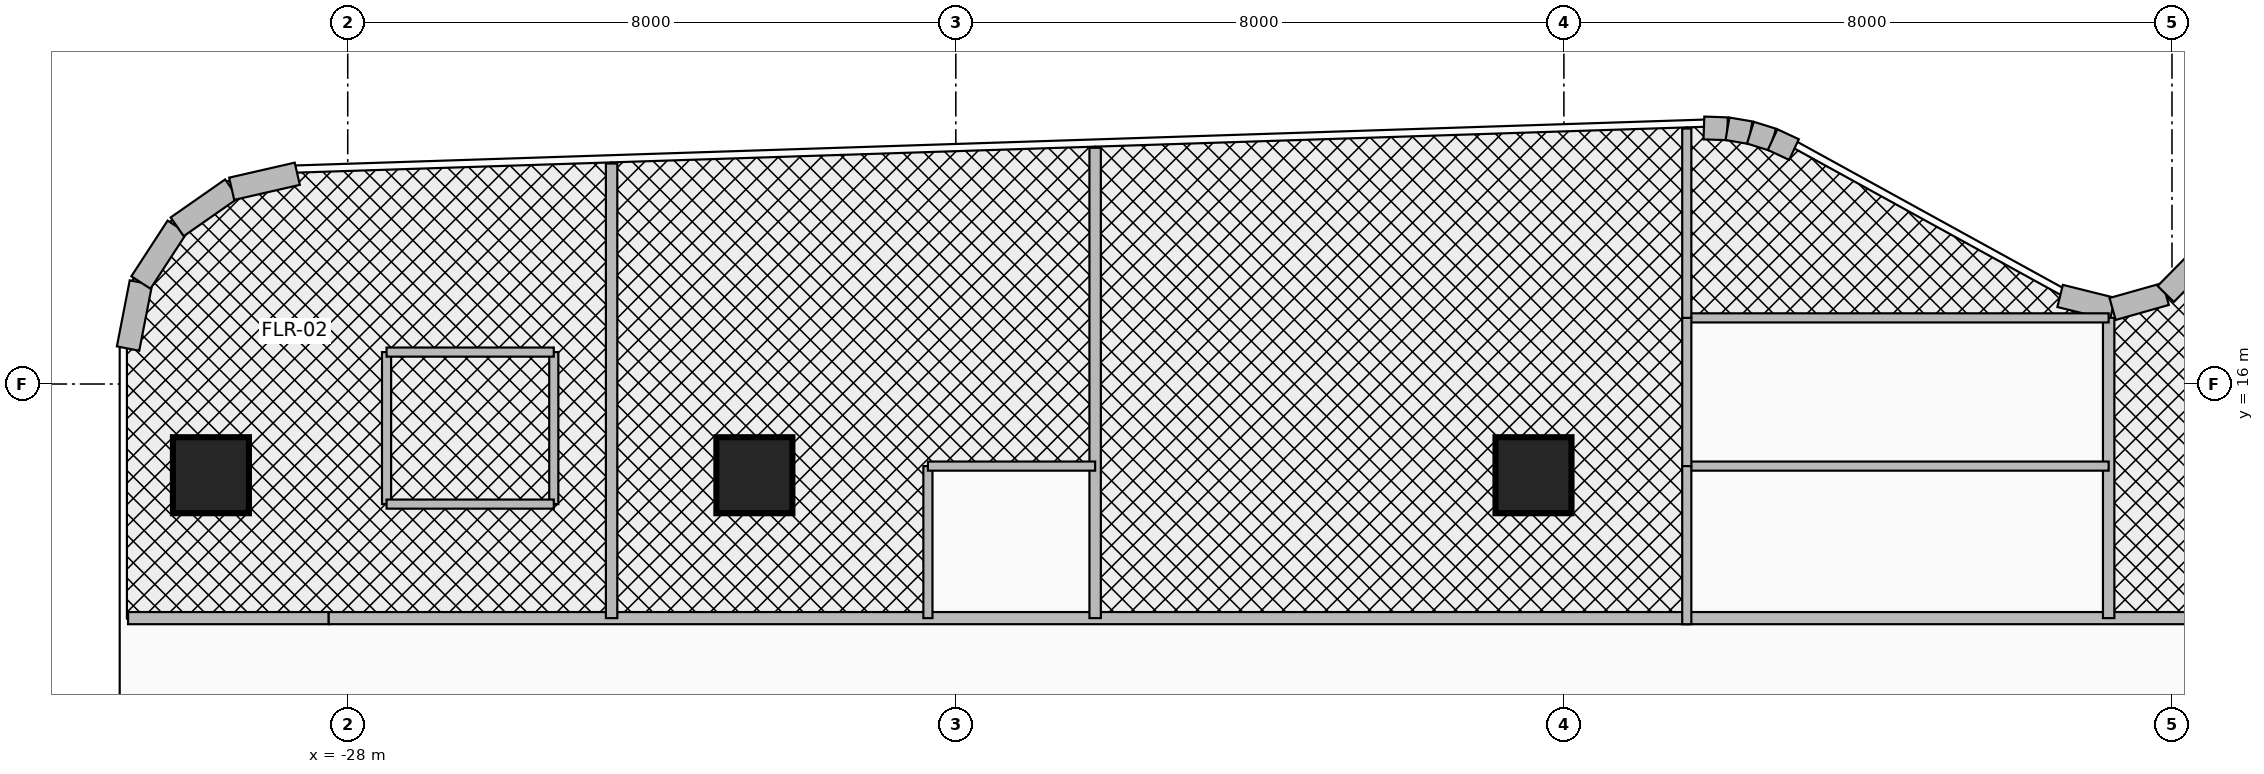
"""IFC4 building model, lengths in metres.
Left out: names, types, materials, properties, quantities, classifications, styles, units other than length and angle.
Written with IfcOpenShell. Run it as: python <this file> out.ifc"""

import sys

from ifc_helpers import new_model, si_unit, direction, frame, frame_2d, origin, origin_2d, place, context, subcontext, project, spatial, rectangle, extrude, source, transform, mapped, element, fill, save


model = new_model("IFC4")
c1 = context("Model", 3, precision=1e-05, world=origin(), true_north=direction((0.0, 1.0)))
c2 = subcontext(c1, "Body", "Model", "MODEL_VIEW")
j1 = project(units=[si_unit("LENGTHUNIT", "METRE"), si_unit("PLANEANGLEUNIT", "RADIAN")], contexts=[c1])
p1 = place(None, origin())
s1 = spatial("IfcSite", under=j1, at=p1, CompositionType="ELEMENT")
p2 = place(p1, origin())
s2 = spatial("IfcBuilding", under=s1, at=p2, CompositionType="ELEMENT")
p3 = place(p2, frame((0.0, 0.0, 180.5)))
s3 = spatial("IfcBuildingStorey", under=s2, at=p3, CompositionType="ELEMENT", Elevation=180.5)
m1 = source(origin(), c2, "Body", "SweptSolid", [
    extrude(rectangle(XDim=1.0, YDim=1.0, at=origin_2d()), origin(), (0.0, 0.0, 1.0), 3.95),
])
for number, where, z_axis, x_axis in (
    (1, (-29.8, 14.8, 0.0), (0.0, 0.0, 1.0), (1.0, 0.0, 0.0)),
    (2, (-22.65, 14.8, 0.0), (0.0, 0.0, 1.0), (1.0, 0.0, 0.0)),
    (3, (-12.4, 14.8, 0.0), (0.0, 0.0, 1.0), (1.0, 0.0, 0.0)),
):
    element("IfcColumn", number, at=place(p3, frame(where, z_axis=z_axis, x_axis=x_axis)), inside=s3, PredefinedType="COLUMN", context=c2, shape_type="MappedRepresentation", body=[
        mapped(m1, transform((0.0, 0.0, 0.0), x_axis=(1.0, 0.0, 0.0), y_axis=(0.0, 1.0, 0.0), z_axis=(0.0, 0.0, 1.0), scale=1.0)),
    ])
p4 = place(p3, frame((-30.89, 16.466, 0.0), z_axis=(0.0, 0.0, 1.0), x_axis=(0.191128020887, 0.981565117367, 0.0)))
e4 = element("IfcWall", 4, at=p4, inside=s3, PredefinedType="SOLIDWALL", context=c2, shape_type="SweptSolid", body=[
    extrude(rectangle(XDim=0.885, YDim=0.3, at=frame_2d((0.443, 0.0))), origin(), (0.0, 0.0, 1.0), 3.63),
])
p5 = place(p3, frame((-30.721, 17.335, 0.0), z_axis=(0.0, 0.0, 1.0), x_axis=(0.545322000684, 0.838226649284, 0.0)))
e5 = element("IfcWall", 5, at=p5, inside=s3, PredefinedType="SOLIDWALL", context=c2, shape_type="SweptSolid", body=[
    extrude(rectangle(XDim=0.874, YDim=0.3, at=frame_2d((0.437, 0.0))), origin(), (0.0, 0.0, 1.0), 3.63),
])
p6 = place(p3, frame((-30.244, 18.068, 0.0), z_axis=(0.0, 0.0, 1.0), x_axis=(0.820005059444, 0.572356272339, 0.0)))
e6 = element("IfcWall", 6, at=p6, inside=s3, PredefinedType="SOLIDWALL", context=c2, shape_type="SweptSolid", body=[
    extrude(rectangle(XDim=0.875, YDim=0.3, at=frame_2d((0.437, 0.0))), origin(), (0.0, 0.0, 1.0), 3.63),
])
p7 = place(p3, frame((-29.527, 18.569, 0.0), z_axis=(0.0, 0.0, 1.0), x_axis=(0.974798570829, 0.223086858218, 0.0)))
e7 = element("IfcWall", 7, at=p7, inside=s3, PredefinedType="SOLIDWALL", context=c2, shape_type="SweptSolid", body=[
    extrude(rectangle(XDim=0.885, YDim=0.3, at=frame_2d((0.443, 0.0))), origin(), (0.0, 0.0, 1.0), 3.63),
])
p8 = place(p3, frame((-10.158, 19.368, 0.0), z_axis=(0.0, 0.0, 1.0), x_axis=(0.999425494718, -0.03389218949, 0.0)))
e8 = element("IfcWall", 8, at=p8, inside=s3, PredefinedType="SOLIDWALL", context=c2, shape_type="SweptSolid", body=[
    extrude(rectangle(XDim=0.31, YDim=0.3, at=frame_2d((0.155, 0.0))), origin(), (0.0, 0.0, 1.0), 3.63),
])
for number, where, z_axis, x_axis in (
    (9, (-9.848, 19.358, 0.0), (0.0, 0.0, 1.0), (0.986, -0.167, 0.0)),
    (10, (-9.546, 19.307, 0.0), (0.0, 0.0, 1.0), (0.955, -0.297, 0.0)),
):
    element("IfcWall", number, at=place(p3, frame(where, z_axis=z_axis, x_axis=x_axis)), inside=s3, PredefinedType="SOLIDWALL", context=c2, shape_type="SweptSolid", body=[
        extrude(rectangle(XDim=0.306, YDim=0.3, at=frame_2d((0.153, 0.0))), origin(), (0.0, 0.0, 1.0), 3.63),
    ])
p9 = place(p3, frame((-9.254, 19.216, 0.0), z_axis=(0.0, 0.0, 1.0), x_axis=(0.906524902388, -0.42215234377, 0.0)))
e11 = element("IfcWall", 11, at=p9, inside=s3, PredefinedType="SOLIDWALL", context=c2, shape_type="SweptSolid", body=[
    extrude(rectangle(XDim=0.31, YDim=0.3, at=frame_2d((0.155, 0.0))), origin(), (0.0, 0.0, 1.0), 3.63),
])
p10 = place(p3, frame((-5.472, 17.159, 0.0), z_axis=(0.0, 0.0, 1.0), x_axis=(0.970564820059, -0.240840050789, 0.0)))
e12 = element("IfcWall", 12, at=p10, inside=s3, PredefinedType="SOLIDWALL", context=c2, shape_type="SweptSolid", body=[
    extrude(rectangle(XDim=0.712, YDim=0.3, at=frame_2d((0.356, 0.0))), origin(), (0.0, 0.0, 1.0), 3.63),
])
p11 = place(p3, frame((-4.781, 16.987, 0.0), z_axis=(0.0, 0.0, 1.0), x_axis=(0.962494705656, 0.271300463662, 0.0)))
e13 = element("IfcWall", 13, at=p11, inside=s3, PredefinedType="SOLIDWALL", context=c2, shape_type="SweptSolid", body=[
    extrude(rectangle(XDim=0.726, YDim=0.3, at=frame_2d((0.363, 0.0))), origin(), (0.0, 0.0, 1.0), 3.63),
])
p12 = place(p3, frame((-4.082, 17.184, 0.0), z_axis=(0.0, 0.0, 1.0), x_axis=(0.701538604215, 0.712631452293, 0.0)))
e14 = element("IfcWall", 14, at=p12, inside=s3, PredefinedType="SOLIDWALL", context=c2, shape_type="SweptSolid", body=[
    extrude(rectangle(XDim=0.726, YDim=0.3, at=frame_2d((0.363, 0.0))), origin(), (0.0, 0.0, 1.0), 2.615),
])
p13 = place(p3, frame((-30.89, 12.92, 0.0), z_axis=(0.0, 0.0, 1.0), x_axis=(1.0, 0.0, 0.0)))
e15 = element("IfcWall", 15, at=p13, inside=s3, PredefinedType="PARTITIONING", context=c2, shape_type="SweptSolid", body=[
    extrude(rectangle(XDim=2.64, YDim=0.16, at=frame_2d((1.32, 0.0))), origin(), (0.0, 0.0, 1.0), 3.076),
])
p14 = place(p3, frame((-28.25, 12.92, 0.0), z_axis=(0.0, 0.0, 1.0), x_axis=(1.0, 0.0, 0.0)))
e16 = element("IfcWall", 16, at=p14, inside=s3, PredefinedType="PARTITIONING", context=c2, shape_type="SweptSolid", body=[
    extrude(rectangle(XDim=36.75, YDim=0.16, at=frame_2d((18.375, 0.0))), origin(), (0.0, 0.0, 1.0), 2.615),
])
p15 = place(p14, frame((1.386, 0.0, 0.0)))
e17 = element("IfcOpeningElement", 17, at=p15, cuts=e16, PredefinedType="OPENING", context=c2, shape_type="SweptSolid", body=[
    extrude(rectangle(XDim=0.95, YDim=2.15, at=frame_2d((0.475, 1.075))), frame((0.0, 0.095, 0.0), z_axis=(0.0, -1.0, 0.0), x_axis=(1.0, 0.0, 0.0)), (0.0, 0.0, 1.0), 0.19),
])
p16 = place(p14, frame((5.327, 0.0, 0.0)))
e18 = element("IfcOpeningElement", 18, at=p16, cuts=e16, PredefinedType="OPENING", context=c2, shape_type="SweptSolid", body=[
    extrude(rectangle(XDim=0.95, YDim=2.15, at=frame_2d((0.475, 1.075))), frame((0.0, 0.095, 0.0), z_axis=(0.0, -1.0, 0.0), x_axis=(1.0, 0.0, 0.0)), (0.0, 0.0, 1.0), 0.19),
])
p17 = place(p14, frame((13.5, 0.0, 0.0)))
e19 = element("IfcOpeningElement", 19, at=p17, cuts=e16, PredefinedType="OPENING", context=c2, shape_type="SweptSolid", body=[
    extrude(rectangle(XDim=0.95, YDim=2.15, at=frame_2d((0.475, 1.075))), frame((0.0, 0.095, 0.0), z_axis=(0.0, -1.0, 0.0), x_axis=(1.0, 0.0, 0.0)), (0.0, 0.0, 1.0), 0.19),
])
p18 = place(p14, frame((26.834, 0.0, 0.0)))
e20 = element("IfcOpeningElement", 20, at=p18, cuts=e16, PredefinedType="OPENING", context=c2, shape_type="SweptSolid", body=[
    extrude(rectangle(XDim=0.95, YDim=2.15, at=frame_2d((0.475, 1.075))), frame((0.0, 0.095, 0.0), z_axis=(0.0, -1.0, 0.0), x_axis=(1.0, 0.0, 0.0)), (0.0, 0.0, 1.0), 0.19),
])
p19 = place(p3, frame((-18.167, 12.92, 0.0), z_axis=(0.0, 0.0, 1.0), x_axis=(0.0, 1.0, 0.0)))
e21 = element("IfcWall", 21, at=p19, inside=s3, PredefinedType="PARTITIONING", context=c2, shape_type="SweptSolid", body=[
    extrude(rectangle(XDim=6.188, YDim=0.15, at=frame_2d((3.094, 0.0))), origin(), (0.0, 0.0, 1.0), 2.665),
])
p20 = place(p3, frame((-4.833, 12.92, 0.0), z_axis=(0.0, 0.0, 1.0), x_axis=(0.0, 1.0, 0.0)))
e22 = element("IfcWall", 22, at=p20, inside=s3, PredefinedType="PARTITIONING", context=c2, shape_type="SweptSolid", body=[
    extrude(rectangle(XDim=3.951, YDim=0.15, at=frame_2d((1.976, 0.0))), origin(), (0.0, 0.0, 1.0), 2.415),
])
p21 = place(p3, frame((-24.529, 12.92, 0.0), z_axis=(0.0, 0.0, 1.0), x_axis=(0.0, 1.0, 0.0)))
e23 = element("IfcWall", 23, at=p21, inside=s3, PredefinedType="PARTITIONING", context=c2, shape_type="SweptSolid", body=[
    extrude(rectangle(XDim=5.981, YDim=0.15, at=frame_2d((2.99, 0.0))), origin(), (0.0, 0.0, 1.0), 2.665),
])
for number, where, z_axis, x_axis in (
    (24, (-27.489, 14.42, 0.0), (0.0, 0.0, 1.0), (0.0, 1.0, 0.0)),
    (25, (-25.289, 14.42, 0.0), (0.0, 0.0, 1.0), (0.0, 1.0, 0.0)),
):
    element("IfcWall", number, at=place(p3, frame(where, z_axis=z_axis, x_axis=x_axis)), inside=s3, PredefinedType="PARTITIONING", context=c2, shape_type="SweptSolid", body=[
        extrude(rectangle(XDim=2.0, YDim=0.12, at=frame_2d((1.0, 0.0))), origin(), (0.0, 0.0, 1.0), 2.665),
    ])
p22 = place(p3, frame((-27.489, 16.42, 0.0), z_axis=(0.0, 0.0, 1.0), x_axis=(1.0, 0.0, 0.0)))
e26 = element("IfcWall", 26, at=p22, inside=s3, PredefinedType="PARTITIONING", context=c2, shape_type="SweptSolid", body=[
    extrude(rectangle(XDim=2.2, YDim=0.12, at=frame_2d((1.1, 0.0))), origin(), (0.0, 0.0, 1.0), 3.63),
])
p23 = place(p3, frame((-27.489, 14.42, 0.0), z_axis=(0.0, 0.0, 1.0), x_axis=(1.0, 0.0, 0.0)))
e27 = element("IfcWall", 27, at=p23, inside=s3, PredefinedType="PARTITIONING", context=c2, shape_type="SweptSolid", body=[
    extrude(rectangle(XDim=2.2, YDim=0.12, at=frame_2d((1.1, 0.0))), origin(), (0.0, 0.0, 1.0), 3.63),
])
p24 = place(p23, frame((0.675, 0.0, 0.0)))
e28 = element("IfcOpeningElement", 28, at=p24, cuts=e27, PredefinedType="OPENING", context=c2, shape_type="SweptSolid", body=[
    extrude(rectangle(XDim=0.85, YDim=2.1, at=frame_2d((0.425, 1.05))), frame((0.0, 0.075, 0.0), z_axis=(0.0, -1.0, 0.0), x_axis=(1.0, 0.0, 0.0)), (0.0, 0.0, 1.0), 0.15),
])
p25 = place(p3, frame((-20.367, 12.92, 0.0), z_axis=(0.0, 0.0, 1.0), x_axis=(0.0, 1.0, 0.0)))
e29 = element("IfcWall", 29, at=p25, inside=s3, PredefinedType="PARTITIONING", context=c2, shape_type="SweptSolid", body=[
    extrude(rectangle(XDim=2.0, YDim=0.12, at=frame_2d((1.0, 0.0))), origin(), (0.0, 0.0, 1.0), 2.665),
])
p26 = place(p3, frame((-20.367, 14.92, 0.0), z_axis=(0.0, 0.0, 1.0), x_axis=(1.0, 0.0, 0.0)))
e30 = element("IfcWall", 30, at=p26, inside=s3, PredefinedType="PARTITIONING", context=c2, shape_type="SweptSolid", body=[
    extrude(rectangle(XDim=2.2, YDim=0.12, at=frame_2d((1.1, 0.0))), origin(), (0.0, 0.0, 1.0), 2.665),
])
p27 = place(p26, frame((0.675, 0.0, 0.0)))
e31 = element("IfcOpeningElement", 31, at=p27, cuts=e30, PredefinedType="OPENING", context=c2, shape_type="SweptSolid", body=[
    extrude(rectangle(XDim=0.85, YDim=2.1, at=frame_2d((0.425, 1.05))), frame((0.0, 0.075, 0.0), z_axis=(0.0, -1.0, 0.0), x_axis=(1.0, 0.0, 0.0)), (0.0, 0.0, 1.0), 0.15),
])
p28 = place(p3, frame((-10.383, 14.92, 0.0), z_axis=(0.0, 0.0, 1.0), x_axis=(1.0, 0.0, 0.0)))
e32 = element("IfcWall", 32, at=p28, inside=s3, PredefinedType="PARTITIONING", context=c2, shape_type="SweptSolid", body=[
    extrude(rectangle(XDim=5.55, YDim=0.12, at=frame_2d((2.775, 0.0))), origin(), (0.0, 0.0, 1.0), 2.415),
])
p29 = place(p3, frame((-10.383, 16.87, 0.0), z_axis=(0.0, 0.0, 1.0), x_axis=(1.0, 0.0, 0.0)))
e33 = element("IfcWall", 33, at=p29, inside=s3, PredefinedType="PARTITIONING", context=c2, shape_type="SweptSolid", body=[
    extrude(rectangle(XDim=5.55, YDim=0.12, at=frame_2d((2.775, 0.0))), origin(), (0.0, 0.0, 1.0), 3.63),
])
p30 = place(p3, frame((-10.383, 14.92, 0.0), z_axis=(0.0, 0.0, 1.0), x_axis=(0.0, 1.0, 0.0)))
e34 = element("IfcWall", 34, at=p30, inside=s3, PredefinedType="PARTITIONING", context=c2, shape_type="SweptSolid", body=[
    extrude(rectangle(XDim=1.95, YDim=0.12, at=frame_2d((0.975, 0.0))), origin(), (0.0, 0.0, 1.0), 2.415),
])
p31 = place(p30, frame((0.55, 0.0, 0.0)))
e35 = element("IfcOpeningElement", 35, at=p31, cuts=e34, PredefinedType="OPENING", context=c2, shape_type="SweptSolid", body=[
    extrude(rectangle(XDim=0.85, YDim=2.1, at=frame_2d((0.425, 1.05))), frame((0.0, 0.075, 0.0), z_axis=(0.0, -1.0, 0.0), x_axis=(1.0, 0.0, 0.0)), (0.0, 0.0, 1.0), 0.15),
])
p32 = place(p3, frame((-10.383, 12.84, 0.0), z_axis=(0.0, 0.0, 1.0), x_axis=(0.0, 1.0, 0.0)))
e36 = element("IfcWall", 36, at=p32, inside=s3, PredefinedType="PARTITIONING", context=c2, shape_type="SweptSolid", body=[
    extrude(rectangle(XDim=2.08, YDim=0.12, at=frame_2d((1.04, 0.0))), origin(), (0.0, 0.0, 1.0), 2.415),
])
p33 = place(p32, frame((0.55, 0.0, 0.0)))
e37 = element("IfcOpeningElement", 37, at=p33, cuts=e36, PredefinedType="OPENING", context=c2, shape_type="SweptSolid", body=[
    extrude(rectangle(XDim=0.9, YDim=2.1, at=frame_2d((0.45, 1.05))), frame((0.0, 0.075, 0.0), z_axis=(0.0, -1.0, 0.0), x_axis=(1.0, 0.0, 0.0)), (0.0, 0.0, 1.0), 0.15),
])
p34 = place(p3, frame((-10.383, 16.87, 0.0), z_axis=(0.0, 0.0, 1.0), x_axis=(0.0, 1.0, 0.0)))
e38 = element("IfcWall", 38, at=p34, inside=s3, PredefinedType="PARTITIONING", context=c2, shape_type="SweptSolid", body=[
    extrude(rectangle(XDim=2.491, YDim=0.12, at=frame_2d((1.246, 0.0))), origin(), (0.0, 0.0, 1.0), 3.63),
])
p35 = place(p34, frame((0.796, 0.0, 0.0)))
e39 = element("IfcOpeningElement", 39, at=p35, cuts=e38, PredefinedType="OPENING", context=c2, shape_type="SweptSolid", body=[
    extrude(rectangle(XDim=0.9, YDim=2.1, at=frame_2d((0.45, 1.05))), frame((0.0, 0.075, 0.0), z_axis=(0.0, -1.0, 0.0), x_axis=(1.0, 0.0, 0.0)), (0.0, 0.0, 1.0), 0.15),
])
p36 = place(p15, frame((0.95, 0.0, 0.0), z_axis=(0.0, 0.0, 1.0), x_axis=(-1.0, 0.0, 0.0)))
e40 = element("IfcDoor", 40, at=p36, inside=s3, OperationType="SINGLE_SWING_LEFT", PredefinedType="DOOR", context=c2, shape_type="SweptSolid", body=[
    extrude(rectangle(XDim=0.95, YDim=2.15, at=frame_2d((0.475, 1.075))), frame((0.0, 0.025, 0.0), z_axis=(0.0, -1.0, 0.0), x_axis=(1.0, 0.0, 0.0)), (0.0, 0.0, 1.0), 0.05),
])
fill(e17, e40)
p37 = place(p24, origin())
e41 = element("IfcDoor", 41, at=p37, inside=s3, OperationType="SINGLE_SWING_RIGHT", PredefinedType="DOOR", context=c2, shape_type="SweptSolid", body=[
    extrude(rectangle(XDim=0.85, YDim=2.1, at=frame_2d((0.425, 1.05))), frame((0.0, 0.025, 0.0), z_axis=(0.0, -1.0, 0.0), x_axis=(1.0, 0.0, 0.0)), (0.0, 0.0, 1.0), 0.05),
])
fill(e28, e41)
p38 = place(p16, frame((0.95, 0.0, 0.0), z_axis=(0.0, 0.0, 1.0), x_axis=(-1.0, 0.0, 0.0)))
e42 = element("IfcDoor", 42, at=p38, inside=s3, OperationType="SINGLE_SWING_LEFT", PredefinedType="DOOR", context=c2, shape_type="SweptSolid", body=[
    extrude(rectangle(XDim=0.95, YDim=2.15, at=frame_2d((0.475, 1.075))), frame((0.0, 0.025, 0.0), z_axis=(0.0, -1.0, 0.0), x_axis=(1.0, 0.0, 0.0)), (0.0, 0.0, 1.0), 0.05),
])
fill(e18, e42)
p39 = place(p27, origin())
e43 = element("IfcDoor", 43, at=p39, inside=s3, OperationType="SINGLE_SWING_RIGHT", PredefinedType="DOOR", context=c2, shape_type="SweptSolid", body=[
    extrude(rectangle(XDim=0.85, YDim=2.1, at=frame_2d((0.425, 1.05))), frame((0.0, 0.025, 0.0), z_axis=(0.0, -1.0, 0.0), x_axis=(1.0, 0.0, 0.0)), (0.0, 0.0, 1.0), 0.05),
])
fill(e31, e43)
p40 = place(p17, frame((0.95, 0.0, 0.0), z_axis=(0.0, 0.0, 1.0), x_axis=(-1.0, 0.0, 0.0)))
e44 = element("IfcDoor", 44, at=p40, inside=s3, OperationType="SINGLE_SWING_LEFT", PredefinedType="DOOR", context=c2, shape_type="SweptSolid", body=[
    extrude(rectangle(XDim=0.95, YDim=2.15, at=frame_2d((0.475, 1.075))), frame((0.0, 0.025, 0.0), z_axis=(0.0, -1.0, 0.0), x_axis=(1.0, 0.0, 0.0)), (0.0, 0.0, 1.0), 0.05),
])
fill(e19, e44)
p41 = place(p31, origin())
e45 = element("IfcDoor", 45, at=p41, inside=s3, OperationType="SINGLE_SWING_RIGHT", PredefinedType="DOOR", context=c2, shape_type="SweptSolid", body=[
    extrude(rectangle(XDim=0.85, YDim=2.1, at=frame_2d((0.425, 1.05))), frame((0.0, 0.025, 0.0), z_axis=(0.0, -1.0, 0.0), x_axis=(1.0, 0.0, 0.0)), (0.0, 0.0, 1.0), 0.05),
])
fill(e35, e45)
p42 = place(p33, origin())
e46 = element("IfcDoor", 46, at=p42, inside=s3, OperationType="SINGLE_SWING_LEFT", PredefinedType="DOOR", context=c2, shape_type="SweptSolid", body=[
    extrude(rectangle(XDim=0.9, YDim=2.1, at=frame_2d((0.45, 1.05))), frame((0.0, 0.025, 0.0), z_axis=(0.0, -1.0, 0.0), x_axis=(1.0, 0.0, 0.0)), (0.0, 0.0, 1.0), 0.05),
])
fill(e37, e46)
p43 = place(p35, origin())
e47 = element("IfcDoor", 47, at=p43, inside=s3, OperationType="SINGLE_SWING_RIGHT", PredefinedType="DOOR", context=c2, shape_type="SweptSolid", body=[
    extrude(rectangle(XDim=0.9, YDim=2.1, at=frame_2d((0.45, 1.05))), frame((0.0, 0.025, 0.0), z_axis=(0.0, -1.0, 0.0), x_axis=(1.0, 0.0, 0.0)), (0.0, 0.0, 1.0), 0.05),
])
fill(e39, e47)
save(model, sys.argv[1])
